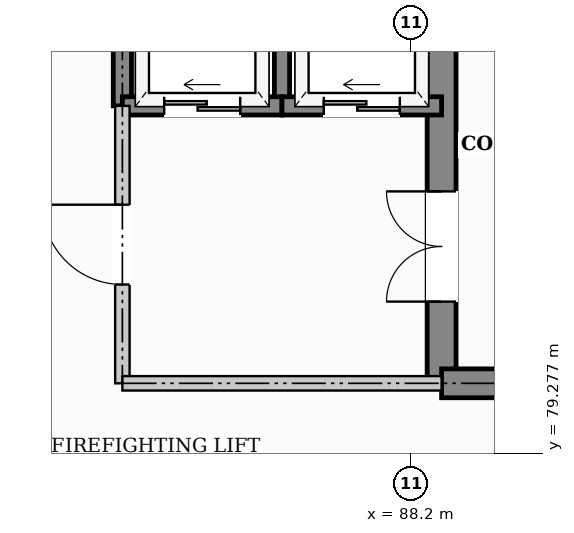
"""IFC4 building model, lengths in metres.
Left out: names, types, materials, properties, quantities, classifications, styles, units other than length and angle.
Written with IfcOpenShell. Run it as: python <this file> out.ifc"""

import sys

from ifc_helpers import new_model, si_unit, direction, frame, frame_2d, origin, place, context, subcontext, project, spatial, rectangle, extrude, element, fill, save


model = new_model("IFC4")
c1 = context("Model", 3, precision=1e-05, world=origin(), true_north=direction((0.0, 1.0)))
c2 = subcontext(c1, "Body", "Model", "MODEL_VIEW")
j1 = project(units=[si_unit("LENGTHUNIT", "METRE"), si_unit("PLANEANGLEUNIT", "RADIAN")], contexts=[c1])
p1 = place(None, origin())
s1 = spatial("IfcSite", under=j1, at=p1, CompositionType="ELEMENT")
p2 = place(p1, origin())
s2 = spatial("IfcBuilding", under=s1, at=p2, CompositionType="ELEMENT")
p3 = place(p2, origin())
s3 = spatial("IfcBuildingStorey", under=s2, at=p3, CompositionType="ELEMENT", Elevation=0.0)
p4 = place(p3, frame((88.6, 80.2, 0.0), z_axis=(0.0, 0.0, 1.0), x_axis=(0.0, 1.0, 0.0)))
e1 = element("IfcWall", 1, at=p4, inside=s3, PredefinedType="SHEAR", context=c2, shape_type="SweptSolid", body=[
    extrude(rectangle(XDim=6.0, YDim=0.38, at=frame_2d((3.0, 0.0))), origin(), (0.0, 0.0, 1.0), 4.78),
])
p5 = place(p4, frame((1.075, 0.0, 0.0)))
e2 = element("IfcOpeningElement", 2, at=p5, cuts=e1, PredefinedType="OPENING", context=c2, shape_type="SweptSolid", body=[
    extrude(rectangle(XDim=1.45, YDim=2.2, at=frame_2d((0.725, 1.1))), frame((0.0, 0.2, 0.0), z_axis=(0.0, -1.0, 0.0), x_axis=(1.0, 0.0, 0.0)), (0.0, 0.0, 1.0), 0.4),
])
p6 = place(p3, frame((88.6, 80.2, 0.0), z_axis=(0.0, 0.0, 1.0), x_axis=(1.0, 0.0, 0.0)))
e3 = element("IfcWall", 3, at=p6, inside=s3, PredefinedType="SHEAR", context=c2, shape_type="SweptSolid", body=[
    extrude(rectangle(XDim=7.0, YDim=0.38, at=frame_2d((3.5, 0.0))), origin(), (0.0, 0.0, 1.0), 4.78),
])
p7 = place(p3, frame((84.4, 83.85, 0.0), z_axis=(0.0, 0.0, 1.0), x_axis=(0.0, 1.0, 0.0)))
e4 = element("IfcWall", 4, at=p7, inside=s3, PredefinedType="SHEAR", context=c2, shape_type="SweptSolid", body=[
    extrude(rectangle(XDim=2.35, YDim=0.24, at=frame_2d((1.175, 0.0))), origin(), (0.0, 0.0, 1.0), 4.78),
])
p8 = place(p3, frame((86.5, 83.85, 0.0), z_axis=(0.0, 0.0, 1.0), x_axis=(0.0, 1.0, 0.0)))
e5 = element("IfcWall", 5, at=p8, inside=s3, PredefinedType="SHEAR", context=c2, shape_type="SweptSolid", body=[
    extrude(rectangle(XDim=2.35, YDim=0.2, at=frame_2d((1.175, 0.0))), origin(), (0.0, 0.0, 1.0), 4.78),
])
p9 = place(p3, frame((84.4, 83.85, 0.0), z_axis=(0.0, 0.0, 1.0), x_axis=(1.0, 0.0, 0.0)))
e6 = element("IfcWall", 6, at=p9, inside=s3, PredefinedType="SHEAR", context=c2, shape_type="SweptSolid", body=[
    extrude(rectangle(XDim=2.1, YDim=0.24, at=frame_2d((1.05, 0.0))), origin(), (0.0, 0.0, 1.0), 4.78),
])
p10 = place(p9, frame((0.55, 0.0, 0.0)))
e7 = element("IfcOpeningElement", 7, at=p10, cuts=e6, PredefinedType="OPENING", context=c2, shape_type="SweptSolid", body=[
    extrude(rectangle(XDim=1.0, YDim=2.1, at=frame_2d((0.5, 1.05))), frame((0.0, 0.13, 0.0), z_axis=(0.0, -1.0, 0.0), x_axis=(1.0, 0.0, 0.0)), (0.0, 0.0, 1.0), 0.26),
])
p11 = place(p3, frame((86.5, 83.85, 0.0), z_axis=(0.0, 0.0, 1.0), x_axis=(1.0, 0.0, 0.0)))
e8 = element("IfcWall", 8, at=p11, inside=s3, PredefinedType="SHEAR", context=c2, shape_type="SweptSolid", body=[
    extrude(rectangle(XDim=2.1, YDim=0.24, at=frame_2d((1.05, 0.0))), origin(), (0.0, 0.0, 1.0), 4.78),
])
p12 = place(p11, frame((0.55, 0.0, 0.0)))
e9 = element("IfcOpeningElement", 9, at=p12, cuts=e8, PredefinedType="OPENING", context=c2, shape_type="SweptSolid", body=[
    extrude(rectangle(XDim=1.0, YDim=2.1, at=frame_2d((0.5, 1.05))), frame((0.0, 0.13, 0.0), z_axis=(0.0, -1.0, 0.0), x_axis=(1.0, 0.0, 0.0)), (0.0, 0.0, 1.0), 0.26),
])
p13 = place(p3, frame((84.4, 80.2, 0.0), z_axis=(0.0, 0.0, 1.0), x_axis=(0.0, 1.0, 0.0)))
e10 = element("IfcWall", 10, at=p13, inside=s3, PredefinedType="PARTITIONING", context=c2, shape_type="SweptSolid", body=[
    extrude(rectangle(XDim=3.65, YDim=0.19, at=frame_2d((1.825, 0.0))), origin(), (0.0, 0.0, 1.0), 4.78),
])
p14 = place(p13, frame((1.3, 0.0, 0.0)))
e11 = element("IfcOpeningElement", 11, at=p14, cuts=e10, PredefinedType="OPENING", context=c2, shape_type="SweptSolid", body=[
    extrude(rectangle(XDim=1.05, YDim=2.15, at=frame_2d((0.525, 1.075))), frame((0.0, 0.105, 0.0), z_axis=(0.0, -1.0, 0.0), x_axis=(1.0, 0.0, 0.0)), (0.0, 0.0, 1.0), 0.21),
])
p15 = place(p3, frame((84.4, 80.2, 0.0), z_axis=(0.0, 0.0, 1.0), x_axis=(1.0, 0.0, 0.0)))
e12 = element("IfcWall", 12, at=p15, inside=s3, PredefinedType="PARTITIONING", context=c2, shape_type="SweptSolid", body=[
    extrude(rectangle(XDim=4.2, YDim=0.19, at=frame_2d((2.1, 0.0))), origin(), (0.0, 0.0, 1.0), 4.78),
])
p16 = place(p5, origin())
e13 = element("IfcDoor", 13, at=p16, inside=s3, OperationType="DOUBLE_DOOR_SINGLE_SWING", PredefinedType="DOOR", context=c2, shape_type="SweptSolid", body=[
    extrude(rectangle(XDim=1.45, YDim=2.2, at=frame_2d((0.725, 1.1))), frame((0.0, 0.025, 0.0), z_axis=(0.0, -1.0, 0.0), x_axis=(1.0, 0.0, 0.0)), (0.0, 0.0, 1.0), 0.05),
])
fill(e2, e13)
p17 = place(p10, origin())
e14 = element("IfcDoor", 14, at=p17, inside=s3, OperationType="SLIDING_TO_LEFT", PredefinedType="DOOR", context=c2, shape_type="SweptSolid", body=[
    extrude(rectangle(XDim=1.0, YDim=2.1, at=frame_2d((0.5, 1.05))), frame((0.0, 0.025, 0.0), z_axis=(0.0, -1.0, 0.0), x_axis=(1.0, 0.0, 0.0)), (0.0, 0.0, 1.0), 0.05),
])
fill(e7, e14)
p18 = place(p12, origin())
e15 = element("IfcDoor", 15, at=p18, inside=s3, OperationType="SLIDING_TO_LEFT", PredefinedType="DOOR", context=c2, shape_type="SweptSolid", body=[
    extrude(rectangle(XDim=1.0, YDim=2.1, at=frame_2d((0.5, 1.05))), frame((0.0, 0.025, 0.0), z_axis=(0.0, -1.0, 0.0), x_axis=(1.0, 0.0, 0.0)), (0.0, 0.0, 1.0), 0.05),
])
fill(e9, e15)
p19 = place(p14, origin())
e16 = element("IfcDoor", 16, at=p19, inside=s3, OperationType="SINGLE_SWING_RIGHT", PredefinedType="DOOR", context=c2, shape_type="SweptSolid", body=[
    extrude(rectangle(XDim=1.05, YDim=2.15, at=frame_2d((0.525, 1.075))), frame((0.0, 0.025, 0.0), z_axis=(0.0, -1.0, 0.0), x_axis=(1.0, 0.0, 0.0)), (0.0, 0.0, 1.0), 0.05),
])
fill(e11, e16)
save(model, sys.argv[1])
